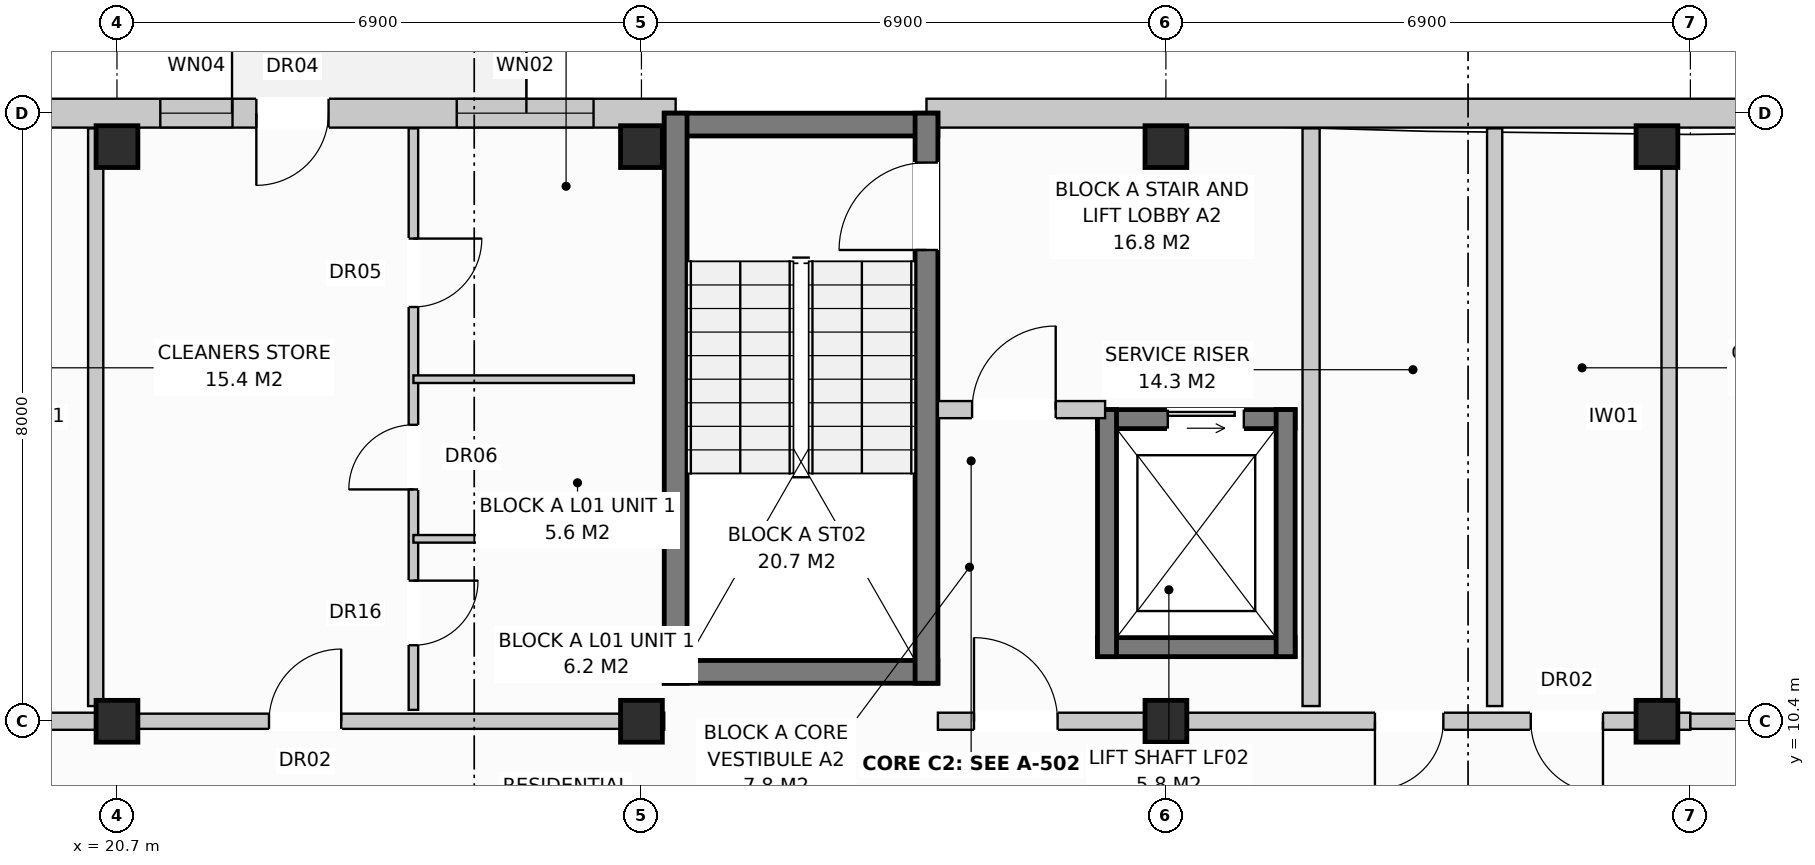
"""IFC4 building model, lengths in metres.
Left out: names, types, materials, properties, quantities, classifications, styles, units other than length and angle.
Written with IfcOpenShell. Run it as: python <this file> out.ifc"""

import sys

from ifc_helpers import new_model, si_unit, direction, frame, frame_2d, origin, origin_with_axes, origin_2d, place, context, subcontext, project, spatial, rectangle, extrude, element, fill, save


model = new_model("IFC4")
c1 = context("Model", 3, precision=1e-05, world=origin(), true_north=direction((0.0, 1.0)))
c2 = subcontext(c1, "Body", "Model", "MODEL_VIEW")
j1 = project(units=[si_unit("LENGTHUNIT", "METRE"), si_unit("PLANEANGLEUNIT", "RADIAN")], contexts=[c1])
p1 = place(None, origin())
s1 = spatial("IfcSite", under=j1, at=p1, CompositionType="ELEMENT")
p2 = place(p1, origin())
s2 = spatial("IfcBuilding", under=s1, at=p2, CompositionType="ELEMENT")
p3 = place(p2, frame((0.0, 0.0, 4.4)))
s3 = spatial("IfcBuildingStorey", under=s2, at=p3, CompositionType="ELEMENT", Elevation=4.4)
for number, where, z_axis, x_axis in (
    (1, (20.7, 10.4, 0.0), (0.0, 0.0, 1.0), (1.0, 0.0, 0.0)),
    (2, (20.7, 17.96, 0.0), (0.0, 0.0, 1.0), (1.0, 0.0, 0.0)),
    (3, (27.6, 10.4, 0.0), (0.0, 0.0, 1.0), (1.0, 0.0, 0.0)),
    (4, (27.6, 17.96, 0.0), (0.0, 0.0, 1.0), (1.0, 0.0, 0.0)),
    (5, (34.5, 10.4, 0.0), (0.0, 0.0, 1.0), (1.0, 0.0, 0.0)),
    (6, (34.5, 17.96, 0.0), (0.0, 0.0, 1.0), (1.0, 0.0, 0.0)),
    (7, (40.96, 10.4, 0.0), (0.0, 0.0, 1.0), (1.0, 0.0, 0.0)),
    (8, (40.96, 17.96, 0.0), (0.0, 0.0, 1.0), (1.0, 0.0, 0.0)),
):
    element("IfcColumn", number, at=place(p3, frame(where, z_axis=z_axis, x_axis=x_axis)), inside=s3, PredefinedType="COLUMN", context=c2, shape_type="SweptSolid", body=[
        extrude(rectangle(XDim=0.55, YDim=0.55, at=origin_2d()), origin(), (0.0, 0.0, 1.0), 3.6),
    ])
p4 = place(p3, frame((10.65, 18.4, 0.0), z_axis=(0.0, 0.0, 1.0), x_axis=(1.0, 0.0, 0.0)))
e9 = element("IfcWall", 9, at=p4, inside=s3, PredefinedType="STANDARD", context=c2, shape_type="SweptSolid", body=[
    extrude(rectangle(XDim=17.4, YDim=0.38, at=frame_2d((8.7, 0.0))), origin(), (0.0, 0.0, 1.0), 3.33),
])
p5 = place(p4, frame((11.884, 0.0, 0.0)))
e10 = element("IfcOpeningElement", 10, at=p5, cuts=e9, PredefinedType="OPENING", context=c2, shape_type="SweptSolid", body=[
    extrude(rectangle(XDim=0.95, YDim=2.1, at=frame_2d((0.475, 1.05))), frame((0.0, 0.202, 0.0), z_axis=(0.0, -1.0, 0.0), x_axis=(1.0, 0.0, 0.0)), (0.0, 0.0, 1.0), 0.404),
])
p6 = place(p4, frame((10.62, 0.0, 0.9)))
e11 = element("IfcOpeningElement", 11, at=p6, cuts=e9, PredefinedType="OPENING", context=c2, shape_type="SweptSolid", body=[
    extrude(rectangle(XDim=0.95, YDim=1.55, at=frame_2d((0.475, 0.775))), frame((0.0, 0.202, 0.0), z_axis=(0.0, -1.0, 0.0), x_axis=(1.0, 0.0, 0.0)), (0.0, 0.0, 1.0), 0.404),
])
p7 = place(p4, frame((14.52, 0.0, 0.8)))
e12 = element("IfcOpeningElement", 12, at=p7, cuts=e9, PredefinedType="OPENING", context=c2, shape_type="SweptSolid", body=[
    extrude(rectangle(XDim=1.8, YDim=1.7, at=frame_2d((0.9, 0.85))), frame((0.0, 0.202, 0.0), z_axis=(0.0, -1.0, 0.0), x_axis=(1.0, 0.0, 0.0)), (0.0, 0.0, 1.0), 0.404),
])
p8 = place(p3, frame((31.35, 18.4, 0.0), z_axis=(0.0, 0.0, 1.0), x_axis=(1.0, 0.0, 0.0)))
e13 = element("IfcWall", 13, at=p8, inside=s3, PredefinedType="STANDARD", context=c2, shape_type="SweptSolid", body=[
    extrude(rectangle(XDim=23.67, YDim=0.38, at=frame_2d((11.835, 0.0))), origin(), (0.0, 0.0, 1.0), 3.33),
])
p9 = place(p8, frame((17.62, 0.0, 0.0)))
e14 = element("IfcOpeningElement", 14, at=p9, cuts=e13, PredefinedType="OPENING", context=c2, shape_type="SweptSolid", body=[
    extrude(rectangle(XDim=0.95, YDim=2.1, at=frame_2d((0.475, 1.05))), frame((0.0, 0.202, 0.0), z_axis=(0.0, -1.0, 0.0), x_axis=(1.0, 0.0, 0.0)), (0.0, 0.0, 1.0), 0.404),
])
p10 = place(p8, frame((11.77, 0.0, 0.8)))
e15 = element("IfcOpeningElement", 15, at=p10, cuts=e13, PredefinedType="OPENING", context=c2, shape_type="SweptSolid", body=[
    extrude(rectangle(XDim=1.9, YDim=1.85, at=frame_2d((0.95, 0.925))), frame((0.0, 0.202, 0.0), z_axis=(0.0, -1.0, 0.0), x_axis=(1.0, 0.0, 0.0)), (0.0, 0.0, 1.0), 0.404),
])
p11 = place(p8, frame((20.645, 0.0, 0.8)))
e16 = element("IfcOpeningElement", 16, at=p11, cuts=e13, PredefinedType="OPENING", context=c2, shape_type="SweptSolid", body=[
    extrude(rectangle(XDim=1.95, YDim=1.65, at=frame_2d((0.975, 0.825))), frame((0.0, 0.202, 0.0), z_axis=(0.0, -1.0, 0.0), x_axis=(1.0, 0.0, 0.0)), (0.0, 0.0, 1.0), 0.404),
])
p12 = place(p3, frame((20.42, 10.6, 0.0), z_axis=(0.0, 0.0, 1.0), x_axis=(0.0, 1.0, 0.0)))
e17 = element("IfcWall", 17, at=p12, inside=s3, PredefinedType="PARTITIONING", context=c2, shape_type="SweptSolid", body=[
    extrude(rectangle(XDim=7.6, YDim=0.2, at=frame_2d((3.8, 0.0))), origin(), (0.0, 0.0, 1.0), 3.33),
])
p13 = place(p3, frame((10.8, 10.4, 0.0), z_axis=(0.0, 0.0, 1.0), x_axis=(1.0, 0.0, 0.0)))
e18 = element("IfcWall", 18, at=p13, inside=s3, PredefinedType="PARTITIONING", context=c2, shape_type="SweptSolid", body=[
    extrude(rectangle(XDim=9.9, YDim=0.225, at=frame_2d((4.95, 0.0))), origin(), (0.0, 0.0, 1.0), 2.77),
])
p14 = place(p13, frame((0.475, 0.0, 0.0)))
e19 = element("IfcOpeningElement", 19, at=p14, cuts=e18, PredefinedType="OPENING", context=c2, shape_type="SweptSolid", body=[
    extrude(rectangle(XDim=1.1, YDim=2.15, at=frame_2d((0.55, 1.075))), frame((0.0, 0.125, 0.0), z_axis=(0.0, -1.0, 0.0), x_axis=(1.0, 0.0, 0.0)), (0.0, 0.0, 1.0), 0.249),
])
p15 = place(p13, frame((5.75, 0.0, 0.0)))
e20 = element("IfcOpeningElement", 20, at=p15, cuts=e18, PredefinedType="OPENING", context=c2, shape_type="SweptSolid", body=[
    extrude(rectangle(XDim=0.9, YDim=2.1, at=frame_2d((0.45, 1.05))), frame((0.0, 0.125, 0.0), z_axis=(0.0, -1.0, 0.0), x_axis=(1.0, 0.0, 0.0)), (0.0, 0.0, 1.0), 0.249),
])
p16 = place(p13, frame((7.8, 0.0, 0.0)))
e21 = element("IfcOpeningElement", 21, at=p16, cuts=e18, PredefinedType="OPENING", context=c2, shape_type="SweptSolid", body=[
    extrude(rectangle(XDim=0.95, YDim=2.15, at=frame_2d((0.475, 1.075))), frame((0.0, 0.125, 0.0), z_axis=(0.0, -1.0, 0.0), x_axis=(1.0, 0.0, 0.0)), (0.0, 0.0, 1.0), 0.249),
])
for number, where, z_axis, x_axis in (
    (22, (27.9, 18.25, 0.0), (0.0, 0.0, 1.0), (1.0, 0.0, 0.0)),
    (23, (27.9, 11.05, 0.0), (0.0, 0.0, 1.0), (1.0, 0.0, 0.0)),
):
    element("IfcWall", number, at=place(p3, frame(where, z_axis=z_axis, x_axis=x_axis)), inside=s3, PredefinedType="SHEAR", context=c2, shape_type="SweptSolid", body=[
        extrude(rectangle(XDim=3.6, YDim=0.3, at=frame_2d((1.8, 0.0))), origin(), (0.0, 0.0, 1.0), 3.33),
    ])
p17 = place(p3, frame((28.05, 10.9, 0.0), z_axis=(0.0, 0.0, 1.0), x_axis=(0.0, 1.0, 0.0)))
e24 = element("IfcWall", 24, at=p17, inside=s3, PredefinedType="SHEAR", context=c2, shape_type="SweptSolid", body=[
    extrude(rectangle(XDim=7.5, YDim=0.3, at=frame_2d((3.75, 0.0))), origin(), (0.0, 0.0, 1.0), 3.33),
])
p18 = place(p3, frame((31.35, 10.9, 0.0), z_axis=(0.0, 0.0, 1.0), x_axis=(0.0, 1.0, 0.0)))
e25 = element("IfcWall", 25, at=p18, inside=s3, PredefinedType="SHEAR", context=c2, shape_type="SweptSolid", body=[
    extrude(rectangle(XDim=7.5, YDim=0.3, at=frame_2d((3.75, 0.0))), origin(), (0.0, 0.0, 1.0), 3.33),
])
p19 = place(p18, frame((5.7, 0.0, 0.0)))
e26 = element("IfcOpeningElement", 26, at=p19, cuts=e25, PredefinedType="OPENING", context=c2, shape_type="SweptSolid", body=[
    extrude(rectangle(XDim=1.15, YDim=2.15, at=frame_2d((0.575, 1.075))), frame((0.0, 0.162, 0.0), z_axis=(0.0, -1.0, 0.0), x_axis=(1.0, 0.0, 0.0)), (0.0, 0.0, 1.0), 0.324),
])
p20 = place(p3, frame((33.6, 14.375, 0.0), z_axis=(0.0, 0.0, 1.0), x_axis=(1.0, 0.0, 0.0)))
e27 = element("IfcWall", 27, at=p20, inside=s3, PredefinedType="SHEAR", context=c2, shape_type="SweptSolid", body=[
    extrude(rectangle(XDim=2.6, YDim=0.25, at=frame_2d((1.3, 0.0))), origin(), (0.0, 0.0, 1.0), 3.33),
])
p21 = place(p20, frame((0.925, 0.0, 0.0)))
e28 = element("IfcOpeningElement", 28, at=p21, cuts=e27, PredefinedType="OPENING", context=c2, shape_type="SweptSolid", body=[
    extrude(rectangle(XDim=1.0, YDim=2.1, at=frame_2d((0.5, 1.05))), frame((0.0, 0.137, 0.0), z_axis=(0.0, -1.0, 0.0), x_axis=(1.0, 0.0, 0.0)), (0.0, 0.0, 1.0), 0.274),
])
p22 = place(p3, frame((33.6, 11.375, 0.0), z_axis=(0.0, 0.0, 1.0), x_axis=(1.0, 0.0, 0.0)))
e29 = element("IfcWall", 29, at=p22, inside=s3, PredefinedType="SHEAR", context=c2, shape_type="SweptSolid", body=[
    extrude(rectangle(XDim=2.6, YDim=0.25, at=frame_2d((1.3, 0.0))), origin(), (0.0, 0.0, 1.0), 3.33),
])
for number, where, z_axis, x_axis in (
    (30, (33.725, 11.25, 0.0), (0.0, 0.0, 1.0), (0.0, 1.0, 0.0)),
    (31, (36.075, 11.25, 0.0), (0.0, 0.0, 1.0), (0.0, 1.0, 0.0)),
):
    element("IfcWall", number, at=place(p3, frame(where, z_axis=z_axis, x_axis=x_axis)), inside=s3, PredefinedType="SHEAR", context=c2, shape_type="SweptSolid", body=[
        extrude(rectangle(XDim=3.25, YDim=0.25, at=frame_2d((1.625, 0.0))), origin(), (0.0, 0.0, 1.0), 3.33),
    ])
p23 = place(p3, frame((36.41, 10.6, 0.0), z_axis=(0.0, 0.0, 1.0), x_axis=(0.0, 1.0, 0.0)))
e32 = element("IfcWall", 32, at=p23, inside=s3, PredefinedType="PARTITIONING", context=c2, shape_type="SweptSolid", body=[
    extrude(rectangle(XDim=7.6, YDim=0.225, at=frame_2d((3.8, 0.0))), origin(), (0.0, 0.0, 1.0), 2.99),
])
p24 = place(p3, frame((31.5, 14.5, 0.0), z_axis=(0.0, 0.0, 1.0), x_axis=(1.0, 0.0, 0.0)))
e33 = element("IfcWall", 33, at=p24, inside=s3, PredefinedType="PARTITIONING", context=c2, shape_type="SweptSolid", body=[
    extrude(rectangle(XDim=2.2, YDim=0.225, at=frame_2d((1.1, 0.0))), origin(), (0.0, 0.0, 1.0), 3.33),
])
p25 = place(p24, frame((0.45, 0.0, 0.0)))
e34 = element("IfcOpeningElement", 34, at=p25, cuts=e33, PredefinedType="OPENING", context=c2, shape_type="SweptSolid", body=[
    extrude(rectangle(XDim=1.1, YDim=2.15, at=frame_2d((0.55, 1.075))), frame((0.0, 0.125, 0.0), z_axis=(0.0, -1.0, 0.0), x_axis=(1.0, 0.0, 0.0)), (0.0, 0.0, 1.0), 0.249),
])
p26 = place(p3, frame((27.6, 10.4, 0.0), z_axis=(0.0, 0.0, 1.0), x_axis=(1.0, 0.0, 0.0)))
e35 = element("IfcWall", 35, at=p26, inside=s3, PredefinedType="PARTITIONING", context=c2, shape_type="SweptSolid", body=[
    extrude(rectangle(XDim=0.3, YDim=0.225, at=frame_2d((0.15, 0.0))), origin(), (0.0, 0.0, 1.0), 3.33),
])
for number, where, z_axis, x_axis in (
    (36, (38.825, 10.6, 0.0), (0.0, 0.0, 1.0), (0.0, 1.0, 0.0)),
    (37, (41.12, 10.6, 0.0), (0.0, 0.0, 1.0), (0.0, 1.0, 0.0)),
):
    element("IfcWall", number, at=place(p3, frame(where, z_axis=z_axis, x_axis=x_axis)), inside=s3, PredefinedType="PARTITIONING", context=c2, shape_type="SweptSolid", body=[
        extrude(rectangle(XDim=7.6, YDim=0.2, at=frame_2d((3.8, 0.0))), origin(), (0.0, 0.0, 1.0), 3.33),
    ])
p27 = place(p3, frame((31.5, 10.4, 0.0), z_axis=(0.0, 0.0, 1.0), x_axis=(1.0, 0.0, 0.0)))
e38 = element("IfcWall", 38, at=p27, inside=s3, PredefinedType="PARTITIONING", context=c2, shape_type="SweptSolid", body=[
    extrude(rectangle(XDim=9.9, YDim=0.225, at=frame_2d((4.95, 0.0))), origin(), (0.0, 0.0, 1.0), 2.77),
])
p28 = place(p27, frame((0.475, 0.0, 0.0)))
e39 = element("IfcOpeningElement", 39, at=p28, cuts=e38, PredefinedType="OPENING", context=c2, shape_type="SweptSolid", body=[
    extrude(rectangle(XDim=1.1, YDim=2.15, at=frame_2d((0.55, 1.075))), frame((0.0, 0.125, 0.0), z_axis=(0.0, -1.0, 0.0), x_axis=(1.0, 0.0, 0.0)), (0.0, 0.0, 1.0), 0.249),
])
p29 = place(p27, frame((5.75, 0.0, 0.0)))
e40 = element("IfcOpeningElement", 40, at=p29, cuts=e38, PredefinedType="OPENING", context=c2, shape_type="SweptSolid", body=[
    extrude(rectangle(XDim=0.9, YDim=2.1, at=frame_2d((0.45, 1.05))), frame((0.0, 0.125, 0.0), z_axis=(0.0, -1.0, 0.0), x_axis=(1.0, 0.0, 0.0)), (0.0, 0.0, 1.0), 0.249),
])
p30 = place(p27, frame((7.8, 0.0, 0.0)))
e41 = element("IfcOpeningElement", 41, at=p30, cuts=e38, PredefinedType="OPENING", context=c2, shape_type="SweptSolid", body=[
    extrude(rectangle(XDim=0.95, YDim=2.15, at=frame_2d((0.475, 1.075))), frame((0.0, 0.125, 0.0), z_axis=(0.0, -1.0, 0.0), x_axis=(1.0, 0.0, 0.0)), (0.0, 0.0, 1.0), 0.249),
])
p31 = place(p3, frame((20.7, 10.4, 0.0), z_axis=(0.0, 0.0, 1.0), x_axis=(1.0, 0.0, 0.0)))
e42 = element("IfcWall", 42, at=p31, inside=s3, PredefinedType="PARTITIONING", context=c2, shape_type="SweptSolid", body=[
    extrude(rectangle(XDim=6.9, YDim=0.2, at=frame_2d((3.45, 0.0))), origin(), (0.0, 0.0, 1.0), 2.77),
])
p32 = place(p31, frame((2.0, 0.0, 0.0)))
e43 = element("IfcOpeningElement", 43, at=p32, cuts=e42, PredefinedType="OPENING", context=c2, shape_type="SweptSolid", body=[
    extrude(rectangle(XDim=0.95, YDim=2.15, at=frame_2d((0.475, 1.075))), frame((0.0, 0.112, 0.0), z_axis=(0.0, -1.0, 0.0), x_axis=(1.0, 0.0, 0.0)), (0.0, 0.0, 1.0), 0.224),
])
p33 = place(p3, frame((24.6, 10.55, 0.0), z_axis=(0.0, 0.0, 1.0), x_axis=(0.0, 1.0, 0.0)))
e44 = element("IfcWall", 44, at=p33, inside=s3, PredefinedType="PARTITIONING", context=c2, shape_type="SweptSolid", body=[
    extrude(rectangle(XDim=7.65, YDim=0.125, at=frame_2d((3.825, 0.0))), origin(), (0.0, 0.0, 1.0), 2.99),
])
p34 = place(p33, frame((0.85, 0.0, 0.0)))
e45 = element("IfcOpeningElement", 45, at=p34, cuts=e44, PredefinedType="OPENING", context=c2, shape_type="SweptSolid", body=[
    extrude(rectangle(XDim=0.85, YDim=2.1, at=frame_2d((0.425, 1.05))), frame((0.0, 0.074, 0.0), z_axis=(0.0, -1.0, 0.0), x_axis=(1.0, 0.0, 0.0)), (0.0, 0.0, 1.0), 0.149),
])
p35 = place(p33, frame((2.9, 0.0, 0.0)))
e46 = element("IfcOpeningElement", 46, at=p35, cuts=e44, PredefinedType="OPENING", context=c2, shape_type="SweptSolid", body=[
    extrude(rectangle(XDim=0.85, YDim=2.05, at=frame_2d((0.425, 1.025))), frame((0.0, 0.074, 0.0), z_axis=(0.0, -1.0, 0.0), x_axis=(1.0, 0.0, 0.0)), (0.0, 0.0, 1.0), 0.149),
])
p36 = place(p33, frame((5.3, 0.0, 0.0)))
e47 = element("IfcOpeningElement", 47, at=p36, cuts=e44, PredefinedType="OPENING", context=c2, shape_type="SweptSolid", body=[
    extrude(rectangle(XDim=0.9, YDim=2.1, at=frame_2d((0.45, 1.05))), frame((0.0, 0.074, 0.0), z_axis=(0.0, -1.0, 0.0), x_axis=(1.0, 0.0, 0.0)), (0.0, 0.0, 1.0), 0.149),
])
for number, where, z_axis, x_axis in (
    (48, (24.6, 12.8, 0.0), (0.0, 0.0, 1.0), (1.0, 0.0, 0.0)),
    (49, (24.6, 14.9, 0.0), (0.0, 0.0, 1.0), (1.0, 0.0, 0.0)),
):
    element("IfcWall", number, at=place(p3, frame(where, z_axis=z_axis, x_axis=x_axis)), inside=s3, PredefinedType="PARTITIONING", context=c2, shape_type="SweptSolid", body=[
        extrude(rectangle(XDim=2.9, YDim=0.1, at=frame_2d((1.45, 0.0))), origin(), (0.0, 0.0, 1.0), 3.33),
    ])
p37 = place(p3, frame((41.4, 10.4, 0.0), z_axis=(0.0, 0.0, 1.0), x_axis=(1.0, 0.0, 0.0)))
e50 = element("IfcWall", 50, at=p37, inside=s3, PredefinedType="PARTITIONING", context=c2, shape_type="SweptSolid", body=[
    extrude(rectangle(XDim=13.8, YDim=0.2, at=frame_2d((6.9, 0.0))), origin(), (0.0, 0.0, 1.0), 2.77),
])
p38 = place(p37, frame((2.4, 0.0, 0.0)))
e51 = element("IfcOpeningElement", 51, at=p38, cuts=e50, PredefinedType="OPENING", context=c2, shape_type="SweptSolid", body=[
    extrude(rectangle(XDim=0.95, YDim=2.15, at=frame_2d((0.475, 1.075))), frame((0.0, 0.112, 0.0), z_axis=(0.0, -1.0, 0.0), x_axis=(1.0, 0.0, 0.0)), (0.0, 0.0, 1.0), 0.224),
])
p39 = place(p5, frame((0.95, 0.0, 0.0), z_axis=(0.0, 0.0, 1.0), x_axis=(-1.0, 0.0, 0.0)))
e52 = element("IfcDoor", 52, at=p39, inside=s3, OperationType="SINGLE_SWING_LEFT", PredefinedType="DOOR", context=c2, shape_type="SweptSolid", body=[
    extrude(rectangle(XDim=0.95, YDim=2.1, at=frame_2d((0.475, 1.05))), frame((0.0, 0.025, 0.0), z_axis=(0.0, -1.0, 0.0), x_axis=(1.0, 0.0, 0.0)), (0.0, 0.0, 1.0), 0.05),
])
fill(e10, e52)
p40 = place(p6, origin_with_axes())
e53 = element("IfcWindow", 53, at=p40, inside=s3, PartitioningType="SINGLE_PANEL", PredefinedType="WINDOW", context=c2, shape_type="SweptSolid", body=[
    extrude(rectangle(XDim=0.95, YDim=1.55, at=frame_2d((0.475, 0.775))), frame((0.0, 0.03, 0.0), z_axis=(0.0, -1.0, 0.0), x_axis=(1.0, 0.0, 0.0)), (0.0, 0.0, 1.0), 0.06),
])
fill(e11, e53)
p41 = place(p7, origin_with_axes())
e54 = element("IfcWindow", 54, at=p41, inside=s3, PartitioningType="SINGLE_PANEL", PredefinedType="WINDOW", context=c2, shape_type="SweptSolid", body=[
    extrude(rectangle(XDim=1.8, YDim=1.7, at=frame_2d((0.9, 0.85))), frame((0.0, 0.03, 0.0), z_axis=(0.0, -1.0, 0.0), x_axis=(1.0, 0.0, 0.0)), (0.0, 0.0, 1.0), 0.06),
])
fill(e12, e54)
p42 = place(p19, origin_with_axes())
e55 = element("IfcDoor", 55, at=p42, inside=s3, OperationType="SINGLE_SWING_LEFT", PredefinedType="DOOR", context=c2, shape_type="SweptSolid", body=[
    extrude(rectangle(XDim=1.15, YDim=2.15, at=frame_2d((0.575, 1.075))), frame((0.0, 0.025, 0.0), z_axis=(0.0, -1.0, 0.0), x_axis=(1.0, 0.0, 0.0)), (0.0, 0.0, 1.0), 0.05),
])
fill(e26, e55)
p43 = place(p21, origin_with_axes())
e56 = element("IfcDoor", 56, at=p43, inside=s3, OperationType="SLIDING_TO_LEFT", PredefinedType="DOOR", context=c2, shape_type="SweptSolid", body=[
    extrude(rectangle(XDim=1.0, YDim=2.1, at=frame_2d((0.5, 1.05))), frame((0.0, 0.025, 0.0), z_axis=(0.0, -1.0, 0.0), x_axis=(1.0, 0.0, 0.0)), (0.0, 0.0, 1.0), 0.05),
])
fill(e28, e56)
p44 = place(p25, origin_with_axes())
e57 = element("IfcDoor", 57, at=p44, inside=s3, OperationType="SINGLE_SWING_RIGHT", PredefinedType="DOOR", context=c2, shape_type="SweptSolid", body=[
    extrude(rectangle(XDim=1.1, YDim=2.15, at=frame_2d((0.55, 1.075))), frame((0.0, 0.025, 0.0), z_axis=(0.0, -1.0, 0.0), x_axis=(1.0, 0.0, 0.0)), (0.0, 0.0, 1.0), 0.05),
])
fill(e34, e57)
p45 = place(p28, origin_with_axes())
e58 = element("IfcDoor", 58, at=p45, inside=s3, OperationType="SINGLE_SWING_LEFT", PredefinedType="DOOR", context=c2, shape_type="SweptSolid", body=[
    extrude(rectangle(XDim=1.1, YDim=2.15, at=frame_2d((0.55, 1.075))), frame((0.0, 0.025, 0.0), z_axis=(0.0, -1.0, 0.0), x_axis=(1.0, 0.0, 0.0)), (0.0, 0.0, 1.0), 0.05),
])
fill(e39, e58)
p46 = place(p29, frame((0.9, 0.0, 0.0), z_axis=(0.0, 0.0, 1.0), x_axis=(-1.0, 0.0, 0.0)))
e59 = element("IfcDoor", 59, at=p46, inside=s3, OperationType="SINGLE_SWING_LEFT", PredefinedType="DOOR", context=c2, shape_type="SweptSolid", body=[
    extrude(rectangle(XDim=0.9, YDim=2.1, at=frame_2d((0.45, 1.05))), frame((0.0, 0.025, 0.0), z_axis=(0.0, -1.0, 0.0), x_axis=(1.0, 0.0, 0.0)), (0.0, 0.0, 1.0), 0.05),
])
fill(e40, e59)
p47 = place(p30, frame((0.95, 0.0, 0.0), z_axis=(0.0, 0.0, 1.0), x_axis=(-1.0, 0.0, 0.0)))
e60 = element("IfcDoor", 60, at=p47, inside=s3, OperationType="SINGLE_SWING_RIGHT", PredefinedType="DOOR", context=c2, shape_type="SweptSolid", body=[
    extrude(rectangle(XDim=0.95, YDim=2.15, at=frame_2d((0.475, 1.075))), frame((0.0, 0.025, 0.0), z_axis=(0.0, -1.0, 0.0), x_axis=(1.0, 0.0, 0.0)), (0.0, 0.0, 1.0), 0.05),
])
fill(e41, e60)
p48 = place(p32, origin_with_axes())
e61 = element("IfcDoor", 61, at=p48, inside=s3, OperationType="SINGLE_SWING_RIGHT", PredefinedType="DOOR", context=c2, shape_type="SweptSolid", body=[
    extrude(rectangle(XDim=0.95, YDim=2.15, at=frame_2d((0.475, 1.075))), frame((0.0, 0.025, 0.0), z_axis=(0.0, -1.0, 0.0), x_axis=(1.0, 0.0, 0.0)), (0.0, 0.0, 1.0), 0.05),
])
fill(e43, e61)
p49 = place(p34, frame((0.85, 0.0, 0.0), z_axis=(0.0, 0.0, 1.0), x_axis=(-1.0, 0.0, 0.0)))
e62 = element("IfcDoor", 62, at=p49, inside=s3, OperationType="SINGLE_SWING_RIGHT", PredefinedType="DOOR", context=c2, shape_type="SweptSolid", body=[
    extrude(rectangle(XDim=0.85, YDim=2.1, at=frame_2d((0.425, 1.05))), frame((0.0, 0.025, 0.0), z_axis=(0.0, -1.0, 0.0), x_axis=(1.0, 0.0, 0.0)), (0.0, 0.0, 1.0), 0.05),
])
fill(e45, e62)
p50 = place(p35, origin_with_axes())
e63 = element("IfcDoor", 63, at=p50, inside=s3, OperationType="SINGLE_SWING_LEFT", PredefinedType="DOOR", context=c2, shape_type="SweptSolid", body=[
    extrude(rectangle(XDim=0.85, YDim=2.05, at=frame_2d((0.425, 1.025))), frame((0.0, 0.025, 0.0), z_axis=(0.0, -1.0, 0.0), x_axis=(1.0, 0.0, 0.0)), (0.0, 0.0, 1.0), 0.05),
])
fill(e46, e63)
p51 = place(p36, frame((0.9, 0.0, 0.0), z_axis=(0.0, 0.0, 1.0), x_axis=(-1.0, 0.0, 0.0)))
e64 = element("IfcDoor", 64, at=p51, inside=s3, OperationType="SINGLE_SWING_RIGHT", PredefinedType="DOOR", context=c2, shape_type="SweptSolid", body=[
    extrude(rectangle(XDim=0.9, YDim=2.1, at=frame_2d((0.45, 1.05))), frame((0.0, 0.025, 0.0), z_axis=(0.0, -1.0, 0.0), x_axis=(1.0, 0.0, 0.0)), (0.0, 0.0, 1.0), 0.05),
])
fill(e47, e64)
save(model, sys.argv[1])
